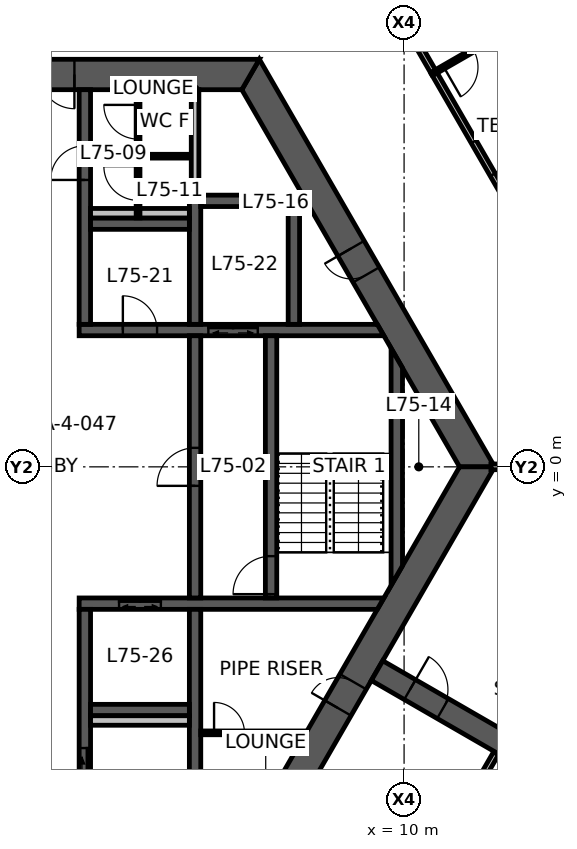
"""IFC4 building model, lengths in metres.
Left out: names, types, materials, properties, quantities, classifications, styles, units other than length and angle.
Written with IfcOpenShell. Run it as: python <this file> out.ifc"""

import sys

from ifc_helpers import new_model, si_unit, direction, frame, frame_2d, origin, place, context, subcontext, project, spatial, polyline, rectangle, outline, extrude, element, fill, save


model = new_model("IFC4")
c1 = context("Model", 3, precision=1e-05, world=origin(), true_north=direction((0.0, 1.0)))
c2 = subcontext(c1, "Body", "Model", "MODEL_VIEW")
j1 = project(units=[si_unit("LENGTHUNIT", "METRE"), si_unit("PLANEANGLEUNIT", "RADIAN")], contexts=[c1])
p1 = place(None, origin())
s1 = spatial("IfcSite", under=j1, at=p1, CompositionType="ELEMENT")
p2 = place(p1, origin())
s2 = spatial("IfcBuilding", under=s1, at=p2, CompositionType="ELEMENT")
p3 = place(p2, frame((0.0, 0.0, 298.6)))
s3 = spatial("IfcBuildingStorey", under=s2, at=p3, CompositionType="ELEMENT", Elevation=298.6)
p4 = place(p3, frame((11.922, 0.0, 0.0), z_axis=(0.0, 0.0, 1.0), x_axis=(-0.500004296715, 0.866022923061, 0.0)))
e1 = element("IfcWall", 1, at=p4, inside=s3, PredefinedType="SHEAR", context=c2, shape_type="SweptSolid", body=[
    extrude(outline(polyline([(-0.231, -0.4), (5.835, -0.4), (6.635, -0.4), (12.153, -0.4), (11.691, 0.4), (6.635, 0.4), (5.835, 0.4), (0.231, 0.4), (-0.231, -0.4)])), origin(), (0.0, 0.0, 1.0), 3.9),
])
p5 = place(p4, frame((5.835, 0.0, 0.0)))
e2 = element("IfcOpeningElement", 2, at=p5, cuts=e1, PredefinedType="OPENING", context=c2, shape_type="SweptSolid", body=[
    extrude(rectangle(XDim=0.8, YDim=2.1, at=frame_2d((0.4, 1.05))), frame((0.0, 0.41, 0.0), z_axis=(0.0, -1.0, 0.0), x_axis=(1.0, 0.0, 0.0)), (0.0, 0.0, 1.0), 0.82),
])
p6 = place(p3, frame((5.961, 10.325, 0.0), z_axis=(0.0, 0.0, 1.0), x_axis=(-1.0, 0.0, 0.0)))
e3 = element("IfcWall", 3, at=p6, inside=s3, PredefinedType="SHEAR", context=c2, shape_type="SweptSolid", body=[
    extrude(outline(polyline([(-0.231, -0.4), (4.636, -0.4), (5.536, -0.4), (6.386, -0.4), (7.286, -0.4), (12.153, -0.4), (11.691, 0.4), (7.286, 0.4), (6.386, 0.4), (5.536, 0.4), (4.636, 0.4), (0.231, 0.4), (-0.231, -0.4)])), origin(), (0.0, 0.0, 1.0), 3.9),
])
p7 = place(p6, frame((6.386, 0.0, 0.0)))
e4 = element("IfcOpeningElement", 4, at=p7, cuts=e3, PredefinedType="OPENING", context=c2, shape_type="SweptSolid", body=[
    extrude(rectangle(XDim=0.9, YDim=2.1, at=frame_2d((0.45, 1.05))), frame((0.0, 0.41, 0.0), z_axis=(0.0, -1.0, 0.0), x_axis=(1.0, 0.0, 0.0)), (0.0, 0.0, 1.0), 0.82),
])
p8 = place(p6, frame((4.636, 0.0, 0.0)))
e5 = element("IfcOpeningElement", 5, at=p8, cuts=e3, PredefinedType="OPENING", context=c2, shape_type="SweptSolid", body=[
    extrude(rectangle(XDim=0.9, YDim=2.1, at=frame_2d((0.45, 1.05))), frame((0.0, 0.41, 0.0), z_axis=(0.0, -1.0, 0.0), x_axis=(1.0, 0.0, 0.0)), (0.0, 0.0, 1.0), 0.82),
])
p9 = place(p3, frame((5.961, -10.325, 0.0), z_axis=(0.0, 0.0, 1.0), x_axis=(0.500004296715, 0.866022923061, 0.0)))
e6 = element("IfcWall", 6, at=p9, inside=s3, PredefinedType="SHEAR", context=c2, shape_type="SweptSolid", body=[
    extrude(outline(polyline([(-0.231, -0.4), (4.594, -0.4), (5.394, -0.4), (12.153, -0.4), (11.691, 0.4), (5.394, 0.4), (4.594, 0.4), (0.231, 0.4), (-0.231, -0.4)])), origin(), (0.0, 0.0, 1.0), 3.9),
])
p10 = place(p9, frame((4.594, 0.0, 0.0)))
e7 = element("IfcOpeningElement", 7, at=p10, cuts=e6, PredefinedType="OPENING", context=c2, shape_type="SweptSolid", body=[
    extrude(rectangle(XDim=0.8, YDim=2.1, at=frame_2d((0.4, 1.05))), frame((0.0, 0.41, 0.0), z_axis=(0.0, -1.0, 0.0), x_axis=(1.0, 0.0, 0.0)), (0.0, 0.0, 1.0), 0.82),
])
p11 = place(p3, frame((9.288, -5.363, 0.0), z_axis=(0.0, 0.0, 1.0), x_axis=(0.866031736626, -0.499989031036, 0.0)))
e8 = element("IfcWall", 8, at=p11, inside=s3, PredefinedType="SHEAR", context=c2, shape_type="SweptSolid", body=[
    extrude(rectangle(XDim=7.796, YDim=0.6, at=frame_2d((3.898, 0.0))), origin(), (0.0, 0.0, 1.0), 3.9),
])
p12 = place(p11, frame((1.0, 0.0, 0.0)))
e9 = element("IfcOpeningElement", 9, at=p12, cuts=e8, PredefinedType="OPENING", context=c2, shape_type="SweptSolid", body=[
    extrude(rectangle(XDim=1.0, YDim=2.1, at=frame_2d((0.5, 1.05))), frame((0.0, 0.31, 0.0), z_axis=(0.0, -1.0, 0.0), x_axis=(1.0, 0.0, 0.0)), (0.0, 0.0, 1.0), 0.62),
])
p13 = place(p3, frame((1.45, 3.6, 0.0), z_axis=(0.0, 0.0, 1.0), x_axis=(1.0, 0.0, 0.0)))
e10 = element("IfcWall", 10, at=p13, inside=s3, PredefinedType="SHEAR", context=c2, shape_type="SweptSolid", body=[
    extrude(outline(polyline([(0.0, -0.15), (1.15, -0.15), (2.05, -0.15), (3.4, -0.15), (4.7, -0.15), (8.019, -0.15), (7.845, 0.15), (4.7, 0.15), (3.4, 0.15), (2.05, 0.15), (1.15, 0.15), (0.0, 0.15), (0.0, -0.15)])), origin(), (0.0, 0.0, 1.0), 3.9),
])
p14 = place(p13, frame((1.15, 0.0, 0.0)))
e11 = element("IfcOpeningElement", 11, at=p14, cuts=e10, PredefinedType="OPENING", context=c2, shape_type="SweptSolid", body=[
    extrude(rectangle(XDim=0.9, YDim=2.1, at=frame_2d((0.45, 1.05))), frame((0.0, 0.16, 0.0), z_axis=(0.0, -1.0, 0.0), x_axis=(1.0, 0.0, 0.0)), (0.0, 0.0, 1.0), 0.32),
])
p15 = place(p13, frame((3.4, 0.0, 0.0)))
e12 = element("IfcOpeningElement", 12, at=p15, cuts=e10, PredefinedType="OPENING", context=c2, shape_type="SweptSolid", body=[
    extrude(rectangle(XDim=1.3, YDim=2.1, at=frame_2d((0.65, 1.05))), frame((0.0, 0.16, 0.0), z_axis=(0.0, -1.0, 0.0), x_axis=(1.0, 0.0, 0.0)), (0.0, 0.0, 1.0), 0.32),
])
p16 = place(p3, frame((1.45, -3.6, 0.0), z_axis=(0.0, 0.0, 1.0), x_axis=(1.0, 0.0, 0.0)))
e13 = element("IfcWall", 13, at=p16, inside=s3, PredefinedType="SHEAR", context=c2, shape_type="SweptSolid", body=[
    extrude(outline(polyline([(0.0, -0.15), (1.05, -0.15), (2.15, -0.15), (7.845, -0.15), (8.019, 0.15), (2.15, 0.15), (1.05, 0.15), (0.0, 0.15), (0.0, -0.15)])), origin(), (0.0, 0.0, 1.0), 3.9),
])
p17 = place(p16, frame((1.05, 0.0, 0.0)))
e14 = element("IfcOpeningElement", 14, at=p17, cuts=e13, PredefinedType="OPENING", context=c2, shape_type="SweptSolid", body=[
    extrude(rectangle(XDim=1.1, YDim=2.1, at=frame_2d((0.55, 1.05))), frame((0.0, 0.16, 0.0), z_axis=(0.0, -1.0, 0.0), x_axis=(1.0, 0.0, 0.0)), (0.0, 0.0, 1.0), 0.32),
])
p18 = place(p3, frame((1.6, 3.75, 0.0), z_axis=(0.0, 0.0, 1.0), x_axis=(0.0, 1.0, 0.0)))
e15 = element("IfcWall", 15, at=p18, inside=s3, PredefinedType="SHEAR", context=c2, shape_type="SweptSolid", body=[
    extrude(rectangle(XDim=6.175, YDim=0.3, at=frame_2d((3.087, 0.0))), origin(), (0.0, 0.0, 1.0), 3.9),
])
p19 = place(p18, frame((3.8, 0.0, 0.0)))
e16 = element("IfcOpeningElement", 16, at=p19, cuts=e15, PredefinedType="OPENING", context=c2, shape_type="SweptSolid", body=[
    extrude(rectangle(XDim=0.9, YDim=2.1, at=frame_2d((0.45, 1.05))), frame((0.0, 0.16, 0.0), z_axis=(0.0, -1.0, 0.0), x_axis=(1.0, 0.0, 0.0)), (0.0, 0.0, 1.0), 0.32),
])
p20 = place(p3, frame((1.6, -3.75, 0.0), z_axis=(0.0, 0.0, 1.0), x_axis=(0.0, -1.0, 0.0)))
e17 = element("IfcWall", 17, at=p20, inside=s3, PredefinedType="SHEAR", context=c2, shape_type="SweptSolid", body=[
    extrude(rectangle(XDim=6.175, YDim=0.3, at=frame_2d((3.087, 0.0))), origin(), (0.0, 0.0, 1.0), 3.9),
])
p21 = place(p20, frame((3.65, 0.0, 0.0)))
e18 = element("IfcOpeningElement", 18, at=p21, cuts=e17, PredefinedType="OPENING", context=c2, shape_type="SweptSolid", body=[
    extrude(rectangle(XDim=1.2, YDim=2.1, at=frame_2d((0.6, 1.05))), frame((0.0, 0.16, 0.0), z_axis=(0.0, -1.0, 0.0), x_axis=(1.0, 0.0, 0.0)), (0.0, 0.0, 1.0), 0.32),
])
p22 = place(p3, frame((4.5, -3.45, 0.0), z_axis=(0.0, 0.0, 1.0), x_axis=(0.0, 1.0, 0.0)))
e19 = element("IfcWall", 19, at=p22, inside=s3, PredefinedType="SHEAR", context=c2, shape_type="SweptSolid", body=[
    extrude(rectangle(XDim=6.9, YDim=0.3, at=frame_2d((3.45, 0.0))), origin(), (0.0, 0.0, 1.0), 3.9),
])
p23 = place(p22, frame((2.95, 0.0, 0.0)))
e20 = element("IfcOpeningElement", 20, at=p23, cuts=e19, PredefinedType="OPENING", context=c2, shape_type="SweptSolid", body=[
    extrude(rectangle(XDim=1.0, YDim=2.1, at=frame_2d((0.5, 1.05))), frame((0.0, 0.16, 0.0), z_axis=(0.0, -1.0, 0.0), x_axis=(1.0, 0.0, 0.0)), (0.0, 0.0, 1.0), 0.32),
])
p24 = place(p3, frame((6.5, -3.45, 0.0), z_axis=(0.0, 0.0, 1.0), x_axis=(0.0, 1.0, 0.0)))
e21 = element("IfcWall", 21, at=p24, inside=s3, PredefinedType="SHEAR", context=c2, shape_type="SweptSolid", body=[
    extrude(rectangle(XDim=6.9, YDim=0.3, at=frame_2d((3.45, 0.0))), origin(), (0.0, 0.0, 1.0), 3.9),
])
p25 = place(p24, frame((0.1, 0.0, 0.0)))
e22 = element("IfcOpeningElement", 22, at=p25, cuts=e21, PredefinedType="OPENING", context=c2, shape_type="SweptSolid", body=[
    extrude(rectangle(XDim=1.0, YDim=2.1, at=frame_2d((0.5, 1.05))), frame((0.0, 0.16, 0.0), z_axis=(0.0, -1.0, 0.0), x_axis=(1.0, 0.0, 0.0)), (0.0, 0.0, 1.0), 0.32),
])
p26 = place(p3, frame((4.5, 3.75, 0.0), z_axis=(0.0, 0.0, 1.0), x_axis=(0.0, 1.0, 0.0)))
e23 = element("IfcWall", 23, at=p26, inside=s3, PredefinedType="SHEAR", context=c2, shape_type="SweptSolid", body=[
    extrude(rectangle(XDim=3.4, YDim=0.3, at=frame_2d((1.7, 0.0))), origin(), (0.0, 0.0, 1.0), 3.9),
])
p27 = place(p3, frame((4.5, -3.75, 0.0), z_axis=(0.0, 0.0, 1.0), x_axis=(0.0, -1.0, 0.0)))
e24 = element("IfcWall", 24, at=p27, inside=s3, PredefinedType="SHEAR", context=c2, shape_type="SweptSolid", body=[
    extrude(rectangle(XDim=6.175, YDim=0.3, at=frame_2d((3.087, 0.0))), origin(), (0.0, 0.0, 1.0), 3.9),
])
for number, where, z_axis, x_axis in (
    (25, (1.75, 6.4, 0.0), (0.0, 0.0, 1.0), (1.0, 0.0, 0.0)),
    (26, (1.75, -6.4, 0.0), (0.0, 0.0, 1.0), (1.0, 0.0, 0.0)),
    (27, (4.65, 7.0, 0.0), (0.0, 0.0, 1.0), (1.0, 0.0, 0.0)),
):
    element("IfcWall", number, at=place(p3, frame(where, z_axis=z_axis, x_axis=x_axis)), inside=s3, PredefinedType="SHEAR", context=c2, shape_type="SweptSolid", body=[
        extrude(rectangle(XDim=2.6, YDim=0.3, at=frame_2d((1.3, 0.0))), origin(), (0.0, 0.0, 1.0), 3.9),
    ])
p28 = place(p3, frame((7.1, 3.75, 0.0), z_axis=(0.0, 0.0, 1.0), x_axis=(0.0, 1.0, 0.0)))
e28 = element("IfcWall", 28, at=p28, inside=s3, PredefinedType="SHEAR", context=c2, shape_type="SweptSolid", body=[
    extrude(rectangle(XDim=3.1, YDim=0.3, at=frame_2d((1.55, 0.0))), origin(), (0.0, 0.0, 1.0), 3.9),
])
p29 = place(p3, frame((9.808, -2.862, 0.0), z_axis=(0.0, 0.0, 1.0), x_axis=(0.0, 1.0, 0.0)))
e29 = element("IfcWall", 29, at=p29, inside=s3, PredefinedType="SHEAR", context=c2, shape_type="SweptSolid", body=[
    extrude(outline(polyline([(0.26, -0.15), (5.465, -0.15), (5.984, 0.15), (-0.26, 0.15), (0.26, -0.15)])), origin(), (0.0, 0.0, 1.0), 3.9),
])
p30 = place(p3, frame((4.5, 7.15, 0.0), z_axis=(0.0, 0.0, 1.0), x_axis=(0.0, 1.0, 0.0)))
e30 = element("IfcWall", 30, at=p30, inside=s3, PredefinedType="STANDARD", context=c2, shape_type="SweptSolid", body=[
    extrude(rectangle(XDim=2.775, YDim=0.2, at=frame_2d((1.388, 0.0))), origin(), (0.0, 0.0, 1.0), 3.9),
])
for number, where, z_axis, x_axis in (
    (31, (1.75, 6.675, 0.0), (0.0, 0.0, 1.0), (1.0, 0.0, 0.0)),
    (32, (1.75, -6.675, 0.0), (0.0, 0.0, 1.0), (1.0, 0.0, 0.0)),
):
    element("IfcWall", number, at=place(p3, frame(where, z_axis=z_axis, x_axis=x_axis)), inside=s3, PredefinedType="PLUMBINGWALL", context=c2, shape_type="SweptSolid", body=[
        extrude(rectangle(XDim=2.6, YDim=0.25, at=frame_2d((1.3, 0.0))), origin(), (0.0, 0.0, 1.0), 3.9),
    ])
p31 = place(p3, frame((3.0, 6.55, 0.0), z_axis=(0.0, 0.0, 1.0), x_axis=(0.0, 1.0, 0.0)))
e33 = element("IfcWall", 33, at=p31, inside=s3, PredefinedType="PARTITIONING", context=c2, shape_type="SweptSolid", body=[
    extrude(rectangle(XDim=3.375, YDim=0.1, at=frame_2d((1.688, 0.0))), origin(), (0.0, 0.0, 1.0), 2.35),
])
p32 = place(p31, frame((2.075, 0.0, 0.0)))
e34 = element("IfcOpeningElement", 34, at=p32, cuts=e33, PredefinedType="OPENING", context=c2, shape_type="SweptSolid", body=[
    extrude(rectangle(XDim=0.9, YDim=2.1, at=frame_2d((0.45, 1.05))), frame((0.0, 0.06, 0.0), z_axis=(0.0, -1.0, 0.0), x_axis=(1.0, 0.0, 0.0)), (0.0, 0.0, 1.0), 0.12),
])
p33 = place(p31, frame((0.462, 0.0, 0.0)))
e35 = element("IfcOpeningElement", 35, at=p33, cuts=e33, PredefinedType="OPENING", context=c2, shape_type="SweptSolid", body=[
    extrude(rectangle(XDim=0.9, YDim=2.1, at=frame_2d((0.45, 1.05))), frame((0.0, 0.06, 0.0), z_axis=(0.0, -1.0, 0.0), x_axis=(1.0, 0.0, 0.0)), (0.0, 0.0, 1.0), 0.12),
])
p34 = place(p3, frame((3.05, 8.175, 0.0), z_axis=(0.0, 0.0, 1.0), x_axis=(1.0, 0.0, 0.0)))
e36 = element("IfcWall", 36, at=p34, inside=s3, PredefinedType="PARTITIONING", context=c2, shape_type="SweptSolid", body=[
    extrude(rectangle(XDim=1.3, YDim=0.1, at=frame_2d((0.65, 0.0))), origin(), (0.0, 0.0, 1.0), 2.35),
])
p35 = place(p3, frame((4.65, -7.0, 0.0), z_axis=(0.0, 0.0, 1.0), x_axis=(1.0, 0.0, 0.0)))
e37 = element("IfcWall", 37, at=p35, inside=s3, PredefinedType="PARTITIONING", context=c2, shape_type="SweptSolid", body=[
    extrude(outline(polyline([(0.0, -0.05), (0.35, -0.05), (1.15, -0.05), (2.74, -0.05), (2.769, 0.0), (2.775, 0.05), (1.15, 0.05), (0.35, 0.05), (0.0, 0.05), (0.0, -0.05)])), origin(), (0.0, 0.0, 1.0), 2.35),
])
p36 = place(p35, frame((0.35, 0.0, 0.0)))
e38 = element("IfcOpeningElement", 38, at=p36, cuts=e37, PredefinedType="OPENING", context=c2, shape_type="SweptSolid", body=[
    extrude(rectangle(XDim=0.8, YDim=2.1, at=frame_2d((0.4, 1.05))), frame((0.0, 0.06, 0.0), z_axis=(0.0, -1.0, 0.0), x_axis=(1.0, 0.0, 0.0)), (0.0, 0.0, 1.0), 0.12),
])
p37 = place(p3, frame((9.119, 13.256, 0.0), z_axis=(0.0, 0.0, 1.0), x_axis=(0.499990242038, -0.866031037473, 0.0)))
e39 = element("IfcWall", 39, at=p37, inside=s3, PredefinedType="PARTITIONING", context=c2, shape_type="SweptSolid", body=[
    extrude(rectangle(XDim=3.341, YDim=0.15, at=frame_2d((1.67, 0.0))), origin(), (0.0, 0.0, 1.0), 2.35),
])
p38 = place(p3, frame((10.785, 10.37, 0.0), z_axis=(0.0, 0.0, 1.0), x_axis=(0.499992432099, -0.86602977307, 0.0)))
e40 = element("IfcWall", 40, at=p38, inside=s3, PredefinedType="PARTITIONING", context=c2, shape_type="SweptSolid", body=[
    extrude(rectangle(XDim=5.192, YDim=0.15, at=frame_2d((2.596, 0.0))), origin(), (0.0, 0.0, 1.0), 2.35),
])
p39 = place(p38, frame((2.096, 0.0, 0.0)))
e41 = element("IfcOpeningElement", 41, at=p39, cuts=e40, PredefinedType="OPENING", context=c2, shape_type="SweptSolid", body=[
    extrude(rectangle(XDim=1.0, YDim=2.1, at=frame_2d((0.5, 1.05))), frame((0.0, 0.085, 0.0), z_axis=(0.0, -1.0, 0.0), x_axis=(1.0, 0.0, 0.0)), (0.0, 0.0, 1.0), 0.17),
])
p40 = place(p3, frame((13.654, 12.022, 0.0), z_axis=(0.0, 0.0, 1.0), x_axis=(-0.866613759554, -0.498979550434, 0.0)))
e42 = element("IfcWall", 42, at=p40, inside=s3, PredefinedType="PARTITIONING", context=c2, shape_type="SweptSolid", body=[
    extrude(rectangle(XDim=3.311, YDim=0.1, at=frame_2d((1.655, 0.0))), origin(), (0.0, 0.0, 1.0), 2.35),
])
p41 = place(p40, frame((2.11, 0.0, 0.0)))
e43 = element("IfcOpeningElement", 43, at=p41, cuts=e42, PredefinedType="OPENING", context=c2, shape_type="SweptSolid", body=[
    extrude(rectangle(XDim=0.9, YDim=2.1, at=frame_2d((0.45, 1.05))), frame((0.0, 0.06, 0.0), z_axis=(0.0, -1.0, 0.0), x_axis=(1.0, 0.0, 0.0)), (0.0, 0.0, 1.0), 0.12),
])
p42 = place(p3, frame((12.419, -7.54, 0.0), z_axis=(0.0, 0.0, 1.0), x_axis=(-0.499996687877, -0.866027316031, 0.0)))
e44 = element("IfcWall", 44, at=p42, inside=s3, PredefinedType="PARTITIONING", context=c2, shape_type="SweptSolid", body=[
    extrude(rectangle(XDim=8.066, YDim=0.15, at=frame_2d((4.033, 0.0))), origin(), (0.0, 0.0, 1.0), 2.35),
])
p43 = place(p42, frame((3.533, 0.0, 0.0)))
e45 = element("IfcOpeningElement", 45, at=p43, cuts=e44, PredefinedType="OPENING", context=c2, shape_type="SweptSolid", body=[
    extrude(rectangle(XDim=1.0, YDim=2.1, at=frame_2d((0.5, 1.05))), frame((0.0, 0.085, 0.0), z_axis=(0.0, -1.0, 0.0), x_axis=(1.0, 0.0, 0.0)), (0.0, 0.0, 1.0), 0.17),
])
p44 = place(p3, frame((12.284, 0.0, 0.0), z_axis=(0.0, 0.0, 1.0), x_axis=(1.0, 0.0, 0.0)))
e46 = element("IfcWall", 46, at=p44, inside=s3, PredefinedType="PARTITIONING", context=c2, shape_type="SweptSolid", body=[
    extrude(rectangle(XDim=4.363, YDim=0.15, at=frame_2d((2.181, 0.0))), origin(), (0.0, 0.0, 1.0), 2.35),
])
p45 = place(p8, origin())
e47 = element("IfcDoor", 47, at=p45, inside=s3, OperationType="SINGLE_SWING_LEFT", PredefinedType="DOOR", context=c2, shape_type="SweptSolid", body=[
    extrude(rectangle(XDim=0.9, YDim=2.1, at=frame_2d((0.45, 1.05))), frame((0.0, 0.025, 0.0), z_axis=(0.0, -1.0, 0.0), x_axis=(1.0, 0.0, 0.0)), (0.0, 0.0, 1.0), 0.05),
])
fill(e5, e47)
p46 = place(p5, origin())
e48 = element("IfcDoor", 48, at=p46, inside=s3, OperationType="SINGLE_SWING_RIGHT", PredefinedType="DOOR", context=c2, shape_type="SweptSolid", body=[
    extrude(rectangle(XDim=0.8, YDim=2.1, at=frame_2d((0.4, 1.05))), frame((0.0, 0.025, 0.0), z_axis=(0.0, -1.0, 0.0), x_axis=(1.0, 0.0, 0.0)), (0.0, 0.0, 1.0), 0.05),
])
fill(e2, e48)
p47 = place(p10, origin())
e49 = element("IfcDoor", 49, at=p47, inside=s3, OperationType="SINGLE_SWING_LEFT", PredefinedType="DOOR", context=c2, shape_type="SweptSolid", body=[
    extrude(rectangle(XDim=0.8, YDim=2.1, at=frame_2d((0.4, 1.05))), frame((0.0, 0.025, 0.0), z_axis=(0.0, -1.0, 0.0), x_axis=(1.0, 0.0, 0.0)), (0.0, 0.0, 1.0), 0.05),
])
fill(e7, e49)
p48 = place(p23, origin())
e50 = element("IfcDoor", 50, at=p48, inside=s3, OperationType="SINGLE_SWING_LEFT", PredefinedType="DOOR", context=c2, shape_type="SweptSolid", body=[
    extrude(rectangle(XDim=1.0, YDim=2.1, at=frame_2d((0.5, 1.05))), frame((0.0, 0.025, 0.0), z_axis=(0.0, -1.0, 0.0), x_axis=(1.0, 0.0, 0.0)), (0.0, 0.0, 1.0), 0.05),
])
fill(e20, e50)
p49 = place(p25, origin())
e51 = element("IfcDoor", 51, at=p49, inside=s3, OperationType="SINGLE_SWING_LEFT", PredefinedType="DOOR", context=c2, shape_type="SweptSolid", body=[
    extrude(rectangle(XDim=1.0, YDim=2.1, at=frame_2d((0.5, 1.05))), frame((0.0, 0.025, 0.0), z_axis=(0.0, -1.0, 0.0), x_axis=(1.0, 0.0, 0.0)), (0.0, 0.0, 1.0), 0.05),
])
fill(e22, e51)
p50 = place(p19, origin())
e52 = element("IfcDoor", 52, at=p50, inside=s3, OperationType="SINGLE_SWING_LEFT", PredefinedType="DOOR", context=c2, shape_type="SweptSolid", body=[
    extrude(rectangle(XDim=0.9, YDim=2.1, at=frame_2d((0.45, 1.05))), frame((0.0, 0.025, 0.0), z_axis=(0.0, -1.0, 0.0), x_axis=(1.0, 0.0, 0.0)), (0.0, 0.0, 1.0), 0.05),
])
fill(e16, e52)
p51 = place(p21, origin())
e53 = element("IfcDoor", 53, at=p51, inside=s3, OperationType="SLIDING_TO_LEFT", PredefinedType="DOOR", context=c2, shape_type="SweptSolid", body=[
    extrude(rectangle(XDim=1.2, YDim=2.1, at=frame_2d((0.6, 1.05))), frame((0.0, 0.025, 0.0), z_axis=(0.0, -1.0, 0.0), x_axis=(1.0, 0.0, 0.0)), (0.0, 0.0, 1.0), 0.05),
])
fill(e18, e53)
p52 = place(p14, origin())
e54 = element("IfcDoor", 54, at=p52, inside=s3, OperationType="SINGLE_SWING_LEFT", PredefinedType="DOOR", context=c2, shape_type="SweptSolid", body=[
    extrude(rectangle(XDim=0.9, YDim=2.1, at=frame_2d((0.45, 1.05))), frame((0.0, 0.025, 0.0), z_axis=(0.0, -1.0, 0.0), x_axis=(1.0, 0.0, 0.0)), (0.0, 0.0, 1.0), 0.05),
])
fill(e11, e54)
p53 = place(p12, origin())
e55 = element("IfcDoor", 55, at=p53, inside=s3, OperationType="SINGLE_SWING_LEFT", PredefinedType="DOOR", context=c2, shape_type="SweptSolid", body=[
    extrude(rectangle(XDim=1.0, YDim=2.1, at=frame_2d((0.5, 1.05))), frame((0.0, 0.025, 0.0), z_axis=(0.0, -1.0, 0.0), x_axis=(1.0, 0.0, 0.0)), (0.0, 0.0, 1.0), 0.05),
])
fill(e9, e55)
p54 = place(p32, origin())
e56 = element("IfcDoor", 56, at=p54, inside=s3, OperationType="SINGLE_SWING_RIGHT", PredefinedType="DOOR", context=c2, shape_type="SweptSolid", body=[
    extrude(rectangle(XDim=0.9, YDim=2.1, at=frame_2d((0.45, 1.05))), frame((0.0, 0.025, 0.0), z_axis=(0.0, -1.0, 0.0), x_axis=(1.0, 0.0, 0.0)), (0.0, 0.0, 1.0), 0.05),
])
fill(e34, e56)
p55 = place(p33, origin())
e57 = element("IfcDoor", 57, at=p55, inside=s3, OperationType="SINGLE_SWING_RIGHT", PredefinedType="DOOR", context=c2, shape_type="SweptSolid", body=[
    extrude(rectangle(XDim=0.9, YDim=2.1, at=frame_2d((0.45, 1.05))), frame((0.0, 0.025, 0.0), z_axis=(0.0, -1.0, 0.0), x_axis=(1.0, 0.0, 0.0)), (0.0, 0.0, 1.0), 0.05),
])
fill(e35, e57)
p56 = place(p36, origin())
e58 = element("IfcDoor", 58, at=p56, inside=s3, OperationType="SINGLE_SWING_LEFT", PredefinedType="DOOR", context=c2, shape_type="SweptSolid", body=[
    extrude(rectangle(XDim=0.8, YDim=2.1, at=frame_2d((0.4, 1.05))), frame((0.0, 0.025, 0.0), z_axis=(0.0, -1.0, 0.0), x_axis=(1.0, 0.0, 0.0)), (0.0, 0.0, 1.0), 0.05),
])
fill(e38, e58)
p57 = place(p39, origin())
e59 = element("IfcDoor", 59, at=p57, inside=s3, OperationType="SINGLE_SWING_RIGHT", PredefinedType="DOOR", context=c2, shape_type="SweptSolid", body=[
    extrude(rectangle(XDim=1.0, YDim=2.1, at=frame_2d((0.5, 1.05))), frame((0.0, 0.025, 0.0), z_axis=(0.0, -1.0, 0.0), x_axis=(1.0, 0.0, 0.0)), (0.0, 0.0, 1.0), 0.05),
])
fill(e41, e59)
p58 = place(p41, origin())
e60 = element("IfcDoor", 60, at=p58, inside=s3, OperationType="SINGLE_SWING_RIGHT", PredefinedType="DOOR", context=c2, shape_type="SweptSolid", body=[
    extrude(rectangle(XDim=0.9, YDim=2.1, at=frame_2d((0.45, 1.05))), frame((0.0, 0.025, 0.0), z_axis=(0.0, -1.0, 0.0), x_axis=(1.0, 0.0, 0.0)), (0.0, 0.0, 1.0), 0.05),
])
fill(e43, e60)
p59 = place(p17, origin())
e61 = element("IfcDoor", 61, at=p59, inside=s3, OperationType="DOUBLE_DOOR_SLIDING", PredefinedType="DOOR", context=c2, shape_type="SweptSolid", body=[
    extrude(rectangle(XDim=1.1, YDim=2.1, at=frame_2d((0.55, 1.05))), frame((0.0, 0.025, 0.0), z_axis=(0.0, -1.0, 0.0), x_axis=(1.0, 0.0, 0.0)), (0.0, 0.0, 1.0), 0.05),
])
fill(e14, e61)
p60 = place(p15, origin())
e62 = element("IfcDoor", 62, at=p60, inside=s3, OperationType="DOUBLE_DOOR_SLIDING", PredefinedType="DOOR", context=c2, shape_type="SweptSolid", body=[
    extrude(rectangle(XDim=1.3, YDim=2.1, at=frame_2d((0.65, 1.05))), frame((0.0, 0.025, 0.0), z_axis=(0.0, -1.0, 0.0), x_axis=(1.0, 0.0, 0.0)), (0.0, 0.0, 1.0), 0.05),
])
fill(e12, e62)
save(model, sys.argv[1])
